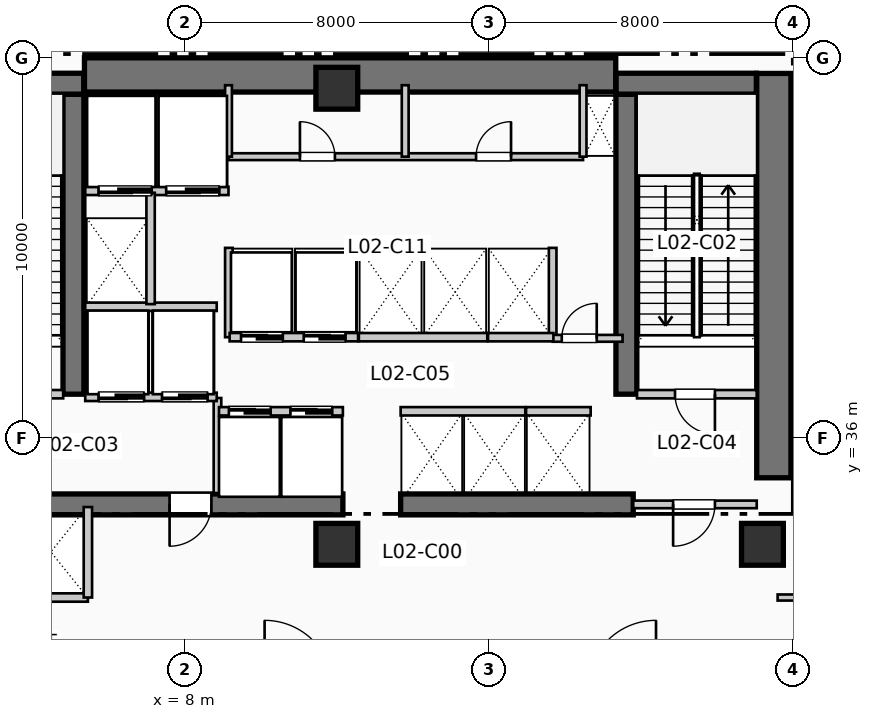
"""IFC4 building model, lengths in metres.
Left out: names, types, materials, properties, quantities, classifications, styles, units other than length and angle.
Written with IfcOpenShell. Run it as: python <this file> out.ifc"""

import sys

from ifc_helpers import new_model, si_unit, direction, frame, frame_2d, origin, origin_2d, place, context, subcontext, project, spatial, rectangle, extrude, element, fill, save


model = new_model("IFC4")
c1 = context("Model", 3, precision=1e-05, world=origin(), true_north=direction((0.0, 1.0)))
c2 = subcontext(c1, "Body", "Model", "MODEL_VIEW")
j1 = project(units=[si_unit("LENGTHUNIT", "METRE"), si_unit("PLANEANGLEUNIT", "RADIAN")], contexts=[c1])
p1 = place(None, origin())
s1 = spatial("IfcSite", under=j1, at=p1, CompositionType="ELEMENT")
p2 = place(p1, origin())
s2 = spatial("IfcBuilding", under=s1, at=p2, CompositionType="ELEMENT")
p3 = place(p2, frame((0.0, 0.0, 11.22)))
s3 = spatial("IfcBuildingStorey", under=s2, at=p3, CompositionType="ELEMENT", Elevation=11.22)
p4 = place(p3, frame((5.36, 45.55, 0.0), z_axis=(0.0, 0.0, 1.0), x_axis=(1.0, 0.0, 0.0)))
e1 = element("IfcWall", 1, at=p4, inside=s3, PredefinedType="SHEAR", context=c2, shape_type="SweptSolid", body=[
    extrude(rectangle(XDim=13.98, YDim=0.9, at=frame_2d((6.99, 0.0))), origin(), (0.0, 0.0, 1.0), 5.28),
])
p5 = place(p3, frame((23.5, 34.95, 0.0), z_axis=(0.0, 0.0, 1.0), x_axis=(0.0, 1.0, 0.0)))
e2 = element("IfcWall", 2, at=p5, inside=s3, PredefinedType="SHEAR", context=c2, shape_type="SweptSolid", body=[
    extrude(rectangle(XDim=10.64, YDim=0.9, at=frame_2d((5.32, 0.0))), origin(), (0.0, 0.0, 1.0), 5.28),
])
p6 = place(p3, frame((1.45, 34.25, 0.0), z_axis=(0.0, 0.0, 1.0), x_axis=(1.0, 0.0, 0.0)))
e3 = element("IfcWall", 3, at=p6, inside=s3, PredefinedType="SHEAR", context=c2, shape_type="SweptSolid", body=[
    extrude(rectangle(XDim=10.71, YDim=0.55, at=frame_2d((5.355, 0.0))), origin(), (0.0, 0.0, 1.0), 5.28),
])
p7 = place(p6, frame((7.25, 0.0, 0.0), z_axis=(0.0, 0.0, 1.0), x_axis=(-1.0, 0.0, 0.0)))
e4 = element("IfcOpeningElement", 4, at=p7, cuts=e3, PredefinedType="OPENING", context=c2, shape_type="SweptSolid", body=[
    extrude(rectangle(XDim=1.1, YDim=2.15, at=frame_2d((0.55, 1.075))), frame((0.0, 0.285, 0.0), z_axis=(0.0, -1.0, 0.0), x_axis=(1.0, 0.0, 0.0)), (0.0, 0.0, 1.0), 0.57),
])
p8 = place(p3, frame((13.68, 34.25, 0.0), z_axis=(0.0, 0.0, 1.0), x_axis=(1.0, 0.0, 0.0)))
e5 = element("IfcWall", 5, at=p8, inside=s3, PredefinedType="SHEAR", context=c2, shape_type="SweptSolid", body=[
    extrude(rectangle(XDim=6.12, YDim=0.55, at=frame_2d((3.06, 0.0))), origin(), (0.0, 0.0, 1.0), 5.28),
])
p9 = place(p3, frame((5.07, 37.15, 0.0), z_axis=(0.0, 0.0, 1.0), x_axis=(0.0, 1.0, 0.0)))
e6 = element("IfcWall", 6, at=p9, inside=s3, PredefinedType="SHEAR", context=c2, shape_type="SweptSolid", body=[
    extrude(rectangle(XDim=7.89, YDim=0.55, at=frame_2d((3.945, 0.0))), origin(), (0.0, 0.0, 1.0), 5.28),
])
p10 = place(p3, frame((1.1, 45.32, 0.0), z_axis=(0.0, 0.0, 1.0), x_axis=(1.0, 0.0, 0.0)))
e7 = element("IfcWall", 7, at=p10, inside=s3, PredefinedType="SHEAR", context=c2, shape_type="SweptSolid", body=[
    extrude(rectangle(XDim=4.24, YDim=0.55, at=frame_2d((2.12, 0.0))), origin(), (0.0, 0.0, 1.0), 5.28),
])
p11 = place(p3, frame((19.62, 37.15, 0.0), z_axis=(0.0, 0.0, 1.0), x_axis=(0.0, 1.0, 0.0)))
e8 = element("IfcWall", 8, at=p11, inside=s3, PredefinedType="SHEAR", context=c2, shape_type="SweptSolid", body=[
    extrude(rectangle(XDim=7.89, YDim=0.55, at=frame_2d((3.945, 0.0))), origin(), (0.0, 0.0, 1.0), 5.28),
])
p12 = place(p3, frame((19.35, 45.32, 0.0), z_axis=(0.0, 0.0, 1.0), x_axis=(1.0, 0.0, 0.0)))
e9 = element("IfcWall", 9, at=p12, inside=s3, PredefinedType="SHEAR", context=c2, shape_type="SweptSolid", body=[
    extrude(rectangle(XDim=3.69, YDim=0.55, at=frame_2d((1.845, 0.0))), origin(), (0.0, 0.0, 1.0), 5.28),
])
for number, where, z_axis, x_axis in (
    (10, (12.0, 33.2, 0.0), (0.0, 0.0, 1.0), (1.0, 0.0, 0.0)),
    (11, (12.0, 45.2, 0.0), (0.0, 0.0, 1.0), (1.0, 0.0, 0.0)),
    (12, (23.2, 33.2, 0.0), (0.0, 0.0, 1.0), (1.0, 0.0, 0.0)),
):
    element("IfcColumn", number, at=place(p3, frame(where, z_axis=z_axis, x_axis=x_axis)), inside=s3, PredefinedType="COLUMN", context=c2, shape_type="SweptSolid", body=[
        extrude(rectangle(XDim=1.1, YDim=1.1, at=origin_2d()), origin(), (0.0, 0.0, 1.0), 5.28),
    ])
p13 = place(p3, frame((1.65, 37.15, 0.0), z_axis=(0.0, 0.0, 1.0), x_axis=(1.0, 0.0, 0.0)))
e13 = element("IfcWall", 13, at=p13, inside=s3, PredefinedType="PARTITIONING", context=c2, shape_type="SweptSolid", body=[
    extrude(rectangle(XDim=3.15, YDim=0.22, at=frame_2d((1.575, 0.0))), origin(), (0.0, 0.0, 1.0), 4.96),
])
p14 = place(p13, frame((2.05, 0.0, 0.0), z_axis=(0.0, 0.0, 1.0), x_axis=(-1.0, 0.0, 0.0)))
e14 = element("IfcOpeningElement", 14, at=p14, cuts=e13, PredefinedType="OPENING", context=c2, shape_type="SweptSolid", body=[
    extrude(rectangle(XDim=1.05, YDim=2.15, at=frame_2d((0.525, 1.075))), frame((0.0, 0.12, 0.0), z_axis=(0.0, -1.0, 0.0), x_axis=(1.0, 0.0, 0.0)), (0.0, 0.0, 1.0), 0.24),
])
p15 = place(p3, frame((8.86, 34.55, 0.0), z_axis=(0.0, 0.0, 1.0), x_axis=(0.0, 1.0, 0.0)))
e15 = element("IfcWall", 15, at=p15, inside=s3, PredefinedType="PARTITIONING", context=c2, shape_type="SweptSolid", body=[
    extrude(rectangle(XDim=2.5, YDim=0.2, at=frame_2d((1.25, 0.0))), origin(), (0.0, 0.0, 1.0), 4.96),
])
p16 = place(p3, frame((19.9, 37.15, 0.0), z_axis=(0.0, 0.0, 1.0), x_axis=(1.0, 0.0, 0.0)))
e16 = element("IfcWall", 16, at=p16, inside=s3, PredefinedType="PARTITIONING", context=c2, shape_type="SweptSolid", body=[
    extrude(rectangle(XDim=3.15, YDim=0.22, at=frame_2d((1.575, 0.0))), origin(), (0.0, 0.0, 1.0), 4.96),
])
p17 = place(p16, frame((2.05, 0.0, 0.0), z_axis=(0.0, 0.0, 1.0), x_axis=(-1.0, 0.0, 0.0)))
e17 = element("IfcOpeningElement", 17, at=p17, cuts=e16, PredefinedType="OPENING", context=c2, shape_type="SweptSolid", body=[
    extrude(rectangle(XDim=1.05, YDim=2.15, at=frame_2d((0.525, 1.075))), frame((0.0, 0.12, 0.0), z_axis=(0.0, -1.0, 0.0), x_axis=(1.0, 0.0, 0.0)), (0.0, 0.0, 1.0), 0.24),
])
p18 = place(p3, frame((19.8, 34.25, 0.0), z_axis=(0.0, 0.0, 1.0), x_axis=(1.0, 0.0, 0.0)))
e18 = element("IfcWall", 18, at=p18, inside=s3, PredefinedType="PARTITIONING", context=c2, shape_type="SweptSolid", body=[
    extrude(rectangle(XDim=3.25, YDim=0.2, at=frame_2d((1.625, 0.0))), origin(), (0.0, 0.0, 1.0), 4.96),
])
p19 = place(p18, frame((2.15, 0.0, 0.0), z_axis=(0.0, 0.0, 1.0), x_axis=(-1.0, 0.0, 0.0)))
e19 = element("IfcOpeningElement", 19, at=p19, cuts=e18, PredefinedType="OPENING", context=c2, shape_type="SweptSolid", body=[
    extrude(rectangle(XDim=1.1, YDim=2.15, at=frame_2d((0.55, 1.075))), frame((0.0, 0.11, 0.0), z_axis=(0.0, -1.0, 0.0), x_axis=(1.0, 0.0, 0.0)), (0.0, 0.0, 1.0), 0.22),
])
p20 = place(p3, frame((5.38, 37.08, 0.0), z_axis=(0.0, 0.0, 1.0), x_axis=(1.0, 0.0, 0.0)))
e20 = element("IfcWall", 20, at=p20, inside=s3, PredefinedType="PARTITIONING", context=c2, shape_type="SweptSolid", body=[
    extrude(rectangle(XDim=3.46, YDim=0.22, at=frame_2d((1.73, 0.0))), origin(), (0.0, 0.0, 1.0), 4.96),
])
p21 = place(p20, frame((1.55, 0.0, 0.0), z_axis=(0.0, 0.0, 1.0), x_axis=(-1.0, 0.0, 0.0)))
e21 = element("IfcOpeningElement", 21, at=p21, cuts=e20, PredefinedType="OPENING", context=c2, shape_type="SweptSolid", body=[
    extrude(rectangle(XDim=1.2, YDim=2.2, at=frame_2d((0.6, 1.1))), frame((0.0, 0.12, 0.0), z_axis=(0.0, -1.0, 0.0), x_axis=(1.0, 0.0, 0.0)), (0.0, 0.0, 1.0), 0.24),
])
p22 = place(p20, frame((3.22, 0.0, 0.0), z_axis=(0.0, 0.0, 1.0), x_axis=(-1.0, 0.0, 0.0)))
e22 = element("IfcOpeningElement", 22, at=p22, cuts=e20, PredefinedType="OPENING", context=c2, shape_type="SweptSolid", body=[
    extrude(rectangle(XDim=1.2, YDim=2.2, at=frame_2d((0.6, 1.1))), frame((0.0, 0.12, 0.0), z_axis=(0.0, -1.0, 0.0), x_axis=(1.0, 0.0, 0.0)), (0.0, 0.0, 1.0), 0.24),
])
p23 = place(p3, frame((5.38, 39.45, 0.0), z_axis=(0.0, 0.0, 1.0), x_axis=(1.0, 0.0, 0.0)))
e23 = element("IfcWall", 23, at=p23, inside=s3, PredefinedType="PARTITIONING", context=c2, shape_type="SweptSolid", body=[
    extrude(rectangle(XDim=3.46, YDim=0.22, at=frame_2d((1.73, 0.0))), origin(), (0.0, 0.0, 1.0), 4.96),
])
p24 = place(p3, frame((5.38, 42.5, 0.0), z_axis=(0.0, 0.0, 1.0), x_axis=(1.0, 0.0, 0.0)))
e24 = element("IfcWall", 24, at=p24, inside=s3, PredefinedType="PARTITIONING", context=c2, shape_type="SweptSolid", body=[
    extrude(rectangle(XDim=3.77, YDim=0.22, at=frame_2d((1.885, 0.0))), origin(), (0.0, 0.0, 1.0), 4.96),
])
p25 = place(p24, frame((1.75, 0.0, 0.0), z_axis=(0.0, 0.0, 1.0), x_axis=(-1.0, 0.0, 0.0)))
e25 = element("IfcOpeningElement", 25, at=p25, cuts=e24, PredefinedType="OPENING", context=c2, shape_type="SweptSolid", body=[
    extrude(rectangle(XDim=1.4, YDim=2.2, at=frame_2d((0.7, 1.1))), frame((0.0, 0.12, 0.0), z_axis=(0.0, -1.0, 0.0), x_axis=(1.0, 0.0, 0.0)), (0.0, 0.0, 1.0), 0.24),
])
p26 = place(p24, frame((3.53, 0.0, 0.0), z_axis=(0.0, 0.0, 1.0), x_axis=(-1.0, 0.0, 0.0)))
e26 = element("IfcOpeningElement", 26, at=p26, cuts=e24, PredefinedType="OPENING", context=c2, shape_type="SweptSolid", body=[
    extrude(rectangle(XDim=1.4, YDim=2.2, at=frame_2d((0.7, 1.1))), frame((0.0, 0.12, 0.0), z_axis=(0.0, -1.0, 0.0), x_axis=(1.0, 0.0, 0.0)), (0.0, 0.0, 1.0), 0.24),
])
p27 = place(p3, frame((7.1, 39.52, 0.0), z_axis=(0.0, 0.0, 1.0), x_axis=(0.0, 1.0, 0.0)))
e27 = element("IfcWall", 27, at=p27, inside=s3, PredefinedType="PARTITIONING", context=c2, shape_type="SweptSolid", body=[
    extrude(rectangle(XDim=2.93, YDim=0.22, at=frame_2d((1.465, 0.0))), origin(), (0.0, 0.0, 1.0), 4.96),
])
p28 = place(p3, frame((1.55, 31.8, 0.0), z_axis=(0.0, 0.0, 1.0), x_axis=(1.0, 0.0, 0.0)))
e28 = element("IfcWall", 28, at=p28, inside=s3, PredefinedType="PARTITIONING", context=c2, shape_type="SweptSolid", body=[
    extrude(rectangle(XDim=3.9, YDim=0.22, at=frame_2d((1.95, 0.0))), origin(), (0.0, 0.0, 1.0), 4.96),
])
p29 = place(p3, frame((5.45, 31.8, 0.0), z_axis=(0.0, 0.0, 1.0), x_axis=(0.0, 1.0, 0.0)))
e29 = element("IfcWall", 29, at=p29, inside=s3, PredefinedType="PARTITIONING", context=c2, shape_type="SweptSolid", body=[
    extrude(rectangle(XDim=2.38, YDim=0.22, at=frame_2d((1.19, 0.0))), origin(), (0.0, 0.0, 1.0), 4.96),
])
for number, where, z_axis, x_axis in (
    (30, (9.16, 38.65, 0.0), (0.0, 0.0, 1.0), (0.0, 1.0, 0.0)),
    (31, (17.68, 38.65, 0.0), (0.0, 0.0, 1.0), (0.0, 1.0, 0.0)),
):
    element("IfcWall", number, at=place(p3, frame(where, z_axis=z_axis, x_axis=x_axis)), inside=s3, PredefinedType="PARTITIONING", context=c2, shape_type="SweptSolid", body=[
        extrude(rectangle(XDim=2.35, YDim=0.2, at=frame_2d((1.175, 0.0))), origin(), (0.0, 0.0, 1.0), 4.96),
    ])
p30 = place(p3, frame((17.68, 38.62, 0.0), z_axis=(0.0, 0.0, 1.0), x_axis=(1.0, 0.0, 0.0)))
e32 = element("IfcWall", 32, at=p30, inside=s3, PredefinedType="PARTITIONING", context=c2, shape_type="SweptSolid", body=[
    extrude(rectangle(XDim=1.84, YDim=0.18, at=frame_2d((0.92, 0.0))), origin(), (0.0, 0.0, 1.0), 4.96),
])
p31 = place(p30, frame((0.24, 0.0, 0.0)))
e33 = element("IfcOpeningElement", 33, at=p31, cuts=e32, PredefinedType="OPENING", context=c2, shape_type="SweptSolid", body=[
    extrude(rectangle(XDim=0.92, YDim=2.1, at=frame_2d((0.46, 1.05))), frame((0.0, 0.1, 0.0), z_axis=(0.0, -1.0, 0.0), x_axis=(1.0, 0.0, 0.0)), (0.0, 0.0, 1.0), 0.2),
])
p32 = place(p3, frame((8.9, 36.7, 0.0), z_axis=(0.0, 0.0, 1.0), x_axis=(1.0, 0.0, 0.0)))
e34 = element("IfcWall", 34, at=p32, inside=s3, PredefinedType="PARTITIONING", context=c2, shape_type="SweptSolid", body=[
    extrude(rectangle(XDim=3.26, YDim=0.22, at=frame_2d((1.63, 0.0))), origin(), (0.0, 0.0, 1.0), 4.96),
])
p33 = place(p32, frame((0.26, 0.0, 0.0)))
e35 = element("IfcOpeningElement", 35, at=p33, cuts=e34, PredefinedType="OPENING", context=c2, shape_type="SweptSolid", body=[
    extrude(rectangle(XDim=1.1, YDim=2.2, at=frame_2d((0.55, 1.1))), frame((0.0, 0.12, 0.0), z_axis=(0.0, -1.0, 0.0), x_axis=(1.0, 0.0, 0.0)), (0.0, 0.0, 1.0), 0.24),
])
p34 = place(p32, frame((1.88, 0.0, 0.0)))
e36 = element("IfcOpeningElement", 36, at=p34, cuts=e34, PredefinedType="OPENING", context=c2, shape_type="SweptSolid", body=[
    extrude(rectangle(XDim=1.1, YDim=2.2, at=frame_2d((0.55, 1.1))), frame((0.0, 0.12, 0.0), z_axis=(0.0, -1.0, 0.0), x_axis=(1.0, 0.0, 0.0)), (0.0, 0.0, 1.0), 0.24),
])
p35 = place(p3, frame((9.18, 38.65, 0.0), z_axis=(0.0, 0.0, 1.0), x_axis=(1.0, 0.0, 0.0)))
e37 = element("IfcWall", 37, at=p35, inside=s3, PredefinedType="PARTITIONING", context=c2, shape_type="SweptSolid", body=[
    extrude(rectangle(XDim=3.38, YDim=0.22, at=frame_2d((1.69, 0.0))), origin(), (0.0, 0.0, 1.0), 4.96),
])
p36 = place(p35, frame((0.3, 0.0, 0.0)))
e38 = element("IfcOpeningElement", 38, at=p36, cuts=e37, PredefinedType="OPENING", context=c2, shape_type="SweptSolid", body=[
    extrude(rectangle(XDim=1.1, YDim=2.2, at=frame_2d((0.55, 1.1))), frame((0.0, 0.12, 0.0), z_axis=(0.0, -1.0, 0.0), x_axis=(1.0, 0.0, 0.0)), (0.0, 0.0, 1.0), 0.24),
])
p37 = place(p35, frame((1.95, 0.0, 0.0)))
e39 = element("IfcOpeningElement", 39, at=p37, cuts=e37, PredefinedType="OPENING", context=c2, shape_type="SweptSolid", body=[
    extrude(rectangle(XDim=1.1, YDim=2.2, at=frame_2d((0.55, 1.1))), frame((0.0, 0.12, 0.0), z_axis=(0.0, -1.0, 0.0), x_axis=(1.0, 0.0, 0.0)), (0.0, 0.0, 1.0), 0.24),
])
p38 = place(p3, frame((13.68, 36.7, 0.0), z_axis=(0.0, 0.0, 1.0), x_axis=(1.0, 0.0, 0.0)))
e40 = element("IfcWall", 40, at=p38, inside=s3, PredefinedType="PARTITIONING", context=c2, shape_type="SweptSolid", body=[
    extrude(rectangle(XDim=3.28, YDim=0.22, at=frame_2d((1.64, 0.0))), origin(), (0.0, 0.0, 1.0), 4.96),
])
p39 = place(p3, frame((12.58, 38.65, 0.0), z_axis=(0.0, 0.0, 1.0), x_axis=(1.0, 0.0, 0.0)))
e41 = element("IfcWall", 41, at=p39, inside=s3, PredefinedType="PARTITIONING", context=c2, shape_type="SweptSolid", body=[
    extrude(rectangle(XDim=3.38, YDim=0.22, at=frame_2d((1.69, 0.0))), origin(), (0.0, 0.0, 1.0), 4.96),
])
p40 = place(p3, frame((16.98, 36.7, 0.0), z_axis=(0.0, 0.0, 1.0), x_axis=(1.0, 0.0, 0.0)))
e42 = element("IfcWall", 42, at=p40, inside=s3, PredefinedType="PARTITIONING", context=c2, shape_type="SweptSolid", body=[
    extrude(rectangle(XDim=1.7, YDim=0.22, at=frame_2d((0.85, 0.0))), origin(), (0.0, 0.0, 1.0), 4.96),
])
p41 = place(p3, frame((15.98, 38.65, 0.0), z_axis=(0.0, 0.0, 1.0), x_axis=(1.0, 0.0, 0.0)))
e43 = element("IfcWall", 43, at=p41, inside=s3, PredefinedType="PARTITIONING", context=c2, shape_type="SweptSolid", body=[
    extrude(rectangle(XDim=1.72, YDim=0.22, at=frame_2d((0.86, 0.0))), origin(), (0.0, 0.0, 1.0), 4.96),
])
p42 = place(p3, frame((9.15, 43.4, 0.0), z_axis=(0.0, 0.0, 1.0), x_axis=(1.0, 0.0, 0.0)))
e44 = element("IfcWall", 44, at=p42, inside=s3, PredefinedType="PLUMBINGWALL", context=c2, shape_type="SweptSolid", body=[
    extrude(rectangle(XDim=9.33, YDim=0.18, at=frame_2d((4.665, 0.0))), origin(), (0.0, 0.0, 1.0), 4.96),
])
p43 = place(p42, frame((1.88, 0.0, 0.0)))
e45 = element("IfcOpeningElement", 45, at=p43, cuts=e44, PredefinedType="OPENING", context=c2, shape_type="SweptSolid", body=[
    extrude(rectangle(XDim=0.92, YDim=2.1, at=frame_2d((0.46, 1.05))), frame((0.0, 0.1, 0.0), z_axis=(0.0, -1.0, 0.0), x_axis=(1.0, 0.0, 0.0)), (0.0, 0.0, 1.0), 0.2),
])
p44 = place(p42, frame((6.515, 0.0, 0.0)))
e46 = element("IfcOpeningElement", 46, at=p44, cuts=e44, PredefinedType="OPENING", context=c2, shape_type="SweptSolid", body=[
    extrude(rectangle(XDim=0.92, YDim=2.1, at=frame_2d((0.46, 1.05))), frame((0.0, 0.1, 0.0), z_axis=(0.0, -1.0, 0.0), x_axis=(1.0, 0.0, 0.0)), (0.0, 0.0, 1.0), 0.2),
])
for number, where, z_axis, x_axis in (
    (47, (9.15, 43.4, 0.0), (0.0, 0.0, 1.0), (0.0, 1.0, 0.0)),
    (48, (18.48, 43.4, 0.0), (0.0, 0.0, 1.0), (0.0, 1.0, 0.0)),
    (49, (13.8, 43.4, 0.0), (0.0, 0.0, 1.0), (0.0, 1.0, 0.0)),
):
    element("IfcWall", number, at=place(p3, frame(where, z_axis=z_axis, x_axis=x_axis)), inside=s3, PredefinedType="PLUMBINGWALL", context=c2, shape_type="SweptSolid", body=[
        extrude(rectangle(XDim=1.88, YDim=0.18, at=frame_2d((0.94, 0.0))), origin(), (0.0, 0.0, 1.0), 4.96),
    ])
p45 = place(p3, frame((23.6, 31.8, 0.0), z_axis=(0.0, 0.0, 1.0), x_axis=(1.0, 0.0, 0.0)))
e50 = element("IfcWall", 50, at=p45, inside=s3, PredefinedType="PARTITIONING", context=c2, shape_type="SweptSolid", body=[
    extrude(rectangle(XDim=42.21, YDim=0.16, at=frame_2d((21.105, 0.0))), origin(), (0.0, 0.0, 1.0), 4.96),
])
p46 = place(p45, frame((5.0, 0.0, 0.0)))
e51 = element("IfcOpeningElement", 51, at=p46, cuts=e50, PredefinedType="OPENING", context=c2, shape_type="SweptSolid", body=[
    extrude(rectangle(XDim=0.95, YDim=2.15, at=frame_2d((0.475, 1.075))), frame((0.0, 0.09, 0.0), z_axis=(0.0, -1.0, 0.0), x_axis=(1.0, 0.0, 0.0)), (0.0, 0.0, 1.0), 0.18),
])
p47 = place(p45, frame((23.0, 0.0, 0.0)))
e52 = element("IfcOpeningElement", 52, at=p47, cuts=e50, PredefinedType="OPENING", context=c2, shape_type="SweptSolid", body=[
    extrude(rectangle(XDim=0.95, YDim=2.15, at=frame_2d((0.475, 1.075))), frame((0.0, 0.09, 0.0), z_axis=(0.0, -1.0, 0.0), x_axis=(1.0, 0.0, 0.0)), (0.0, 0.0, 1.0), 0.18),
])
p48 = place(p7, origin())
e53 = element("IfcDoor", 53, at=p48, inside=s3, OperationType="SINGLE_SWING_LEFT", PredefinedType="DOOR", context=c2, shape_type="SweptSolid", body=[
    extrude(rectangle(XDim=1.1, YDim=2.15, at=frame_2d((0.55, 1.075))), frame((0.0, 0.025, 0.0), z_axis=(0.0, -1.0, 0.0), x_axis=(1.0, 0.0, 0.0)), (0.0, 0.0, 1.0), 0.05),
])
fill(e4, e53)
p49 = place(p17, origin())
e54 = element("IfcDoor", 54, at=p49, inside=s3, OperationType="SINGLE_SWING_RIGHT", PredefinedType="DOOR", context=c2, shape_type="SweptSolid", body=[
    extrude(rectangle(XDim=1.05, YDim=2.15, at=frame_2d((0.525, 1.075))), frame((0.0, 0.025, 0.0), z_axis=(0.0, -1.0, 0.0), x_axis=(1.0, 0.0, 0.0)), (0.0, 0.0, 1.0), 0.05),
])
fill(e17, e54)
p50 = place(p19, origin())
e55 = element("IfcDoor", 55, at=p50, inside=s3, OperationType="SINGLE_SWING_LEFT", PredefinedType="DOOR", context=c2, shape_type="SweptSolid", body=[
    extrude(rectangle(XDim=1.1, YDim=2.15, at=frame_2d((0.55, 1.075))), frame((0.0, 0.025, 0.0), z_axis=(0.0, -1.0, 0.0), x_axis=(1.0, 0.0, 0.0)), (0.0, 0.0, 1.0), 0.05),
])
fill(e19, e55)
p51 = place(p21, origin())
e56 = element("IfcDoor", 56, at=p51, inside=s3, OperationType="SLIDING_TO_RIGHT", PredefinedType="DOOR", context=c2, shape_type="SweptSolid", body=[
    extrude(rectangle(XDim=1.2, YDim=2.2, at=frame_2d((0.6, 1.1))), frame((0.0, 0.025, 0.0), z_axis=(0.0, -1.0, 0.0), x_axis=(1.0, 0.0, 0.0)), (0.0, 0.0, 1.0), 0.05),
])
fill(e21, e56)
p52 = place(p22, origin())
e57 = element("IfcDoor", 57, at=p52, inside=s3, OperationType="SLIDING_TO_RIGHT", PredefinedType="DOOR", context=c2, shape_type="SweptSolid", body=[
    extrude(rectangle(XDim=1.2, YDim=2.2, at=frame_2d((0.6, 1.1))), frame((0.0, 0.025, 0.0), z_axis=(0.0, -1.0, 0.0), x_axis=(1.0, 0.0, 0.0)), (0.0, 0.0, 1.0), 0.05),
])
fill(e22, e57)
p53 = place(p25, origin())
e58 = element("IfcDoor", 58, at=p53, inside=s3, OperationType="SLIDING_TO_LEFT", PredefinedType="DOOR", context=c2, shape_type="SweptSolid", body=[
    extrude(rectangle(XDim=1.4, YDim=2.2, at=frame_2d((0.7, 1.1))), frame((0.0, 0.025, 0.0), z_axis=(0.0, -1.0, 0.0), x_axis=(1.0, 0.0, 0.0)), (0.0, 0.0, 1.0), 0.05),
])
fill(e25, e58)
p54 = place(p26, origin())
e59 = element("IfcDoor", 59, at=p54, inside=s3, OperationType="SLIDING_TO_LEFT", PredefinedType="DOOR", context=c2, shape_type="SweptSolid", body=[
    extrude(rectangle(XDim=1.4, YDim=2.2, at=frame_2d((0.7, 1.1))), frame((0.0, 0.025, 0.0), z_axis=(0.0, -1.0, 0.0), x_axis=(1.0, 0.0, 0.0)), (0.0, 0.0, 1.0), 0.05),
])
fill(e26, e59)
p55 = place(p31, origin())
e60 = element("IfcDoor", 60, at=p55, inside=s3, OperationType="SINGLE_SWING_RIGHT", PredefinedType="DOOR", context=c2, shape_type="SweptSolid", body=[
    extrude(rectangle(XDim=0.92, YDim=2.1, at=frame_2d((0.46, 1.05))), frame((0.0, 0.025, 0.0), z_axis=(0.0, -1.0, 0.0), x_axis=(1.0, 0.0, 0.0)), (0.0, 0.0, 1.0), 0.05),
])
fill(e33, e60)
p56 = place(p33, origin())
e61 = element("IfcDoor", 61, at=p56, inside=s3, OperationType="SLIDING_TO_LEFT", PredefinedType="DOOR", context=c2, shape_type="SweptSolid", body=[
    extrude(rectangle(XDim=1.1, YDim=2.2, at=frame_2d((0.55, 1.1))), frame((0.0, 0.025, 0.0), z_axis=(0.0, -1.0, 0.0), x_axis=(1.0, 0.0, 0.0)), (0.0, 0.0, 1.0), 0.05),
])
fill(e35, e61)
p57 = place(p34, origin())
e62 = element("IfcDoor", 62, at=p57, inside=s3, OperationType="SLIDING_TO_LEFT", PredefinedType="DOOR", context=c2, shape_type="SweptSolid", body=[
    extrude(rectangle(XDim=1.1, YDim=2.2, at=frame_2d((0.55, 1.1))), frame((0.0, 0.025, 0.0), z_axis=(0.0, -1.0, 0.0), x_axis=(1.0, 0.0, 0.0)), (0.0, 0.0, 1.0), 0.05),
])
fill(e36, e62)
p58 = place(p36, origin())
e63 = element("IfcDoor", 63, at=p58, inside=s3, OperationType="SLIDING_TO_LEFT", PredefinedType="DOOR", context=c2, shape_type="SweptSolid", body=[
    extrude(rectangle(XDim=1.1, YDim=2.2, at=frame_2d((0.55, 1.1))), frame((0.0, 0.025, 0.0), z_axis=(0.0, -1.0, 0.0), x_axis=(1.0, 0.0, 0.0)), (0.0, 0.0, 1.0), 0.05),
])
fill(e38, e63)
p59 = place(p37, origin())
e64 = element("IfcDoor", 64, at=p59, inside=s3, OperationType="SLIDING_TO_LEFT", PredefinedType="DOOR", context=c2, shape_type="SweptSolid", body=[
    extrude(rectangle(XDim=1.1, YDim=2.2, at=frame_2d((0.55, 1.1))), frame((0.0, 0.025, 0.0), z_axis=(0.0, -1.0, 0.0), x_axis=(1.0, 0.0, 0.0)), (0.0, 0.0, 1.0), 0.05),
])
fill(e39, e64)
p60 = place(p43, origin())
e65 = element("IfcDoor", 65, at=p60, inside=s3, OperationType="SINGLE_SWING_LEFT", PredefinedType="DOOR", context=c2, shape_type="SweptSolid", body=[
    extrude(rectangle(XDim=0.92, YDim=2.1, at=frame_2d((0.46, 1.05))), frame((0.0, 0.025, 0.0), z_axis=(0.0, -1.0, 0.0), x_axis=(1.0, 0.0, 0.0)), (0.0, 0.0, 1.0), 0.05),
])
fill(e45, e65)
p61 = place(p44, origin())
e66 = element("IfcDoor", 66, at=p61, inside=s3, OperationType="SINGLE_SWING_RIGHT", PredefinedType="DOOR", context=c2, shape_type="SweptSolid", body=[
    extrude(rectangle(XDim=0.92, YDim=2.1, at=frame_2d((0.46, 1.05))), frame((0.0, 0.025, 0.0), z_axis=(0.0, -1.0, 0.0), x_axis=(1.0, 0.0, 0.0)), (0.0, 0.0, 1.0), 0.05),
])
fill(e46, e66)
save(model, sys.argv[1])
